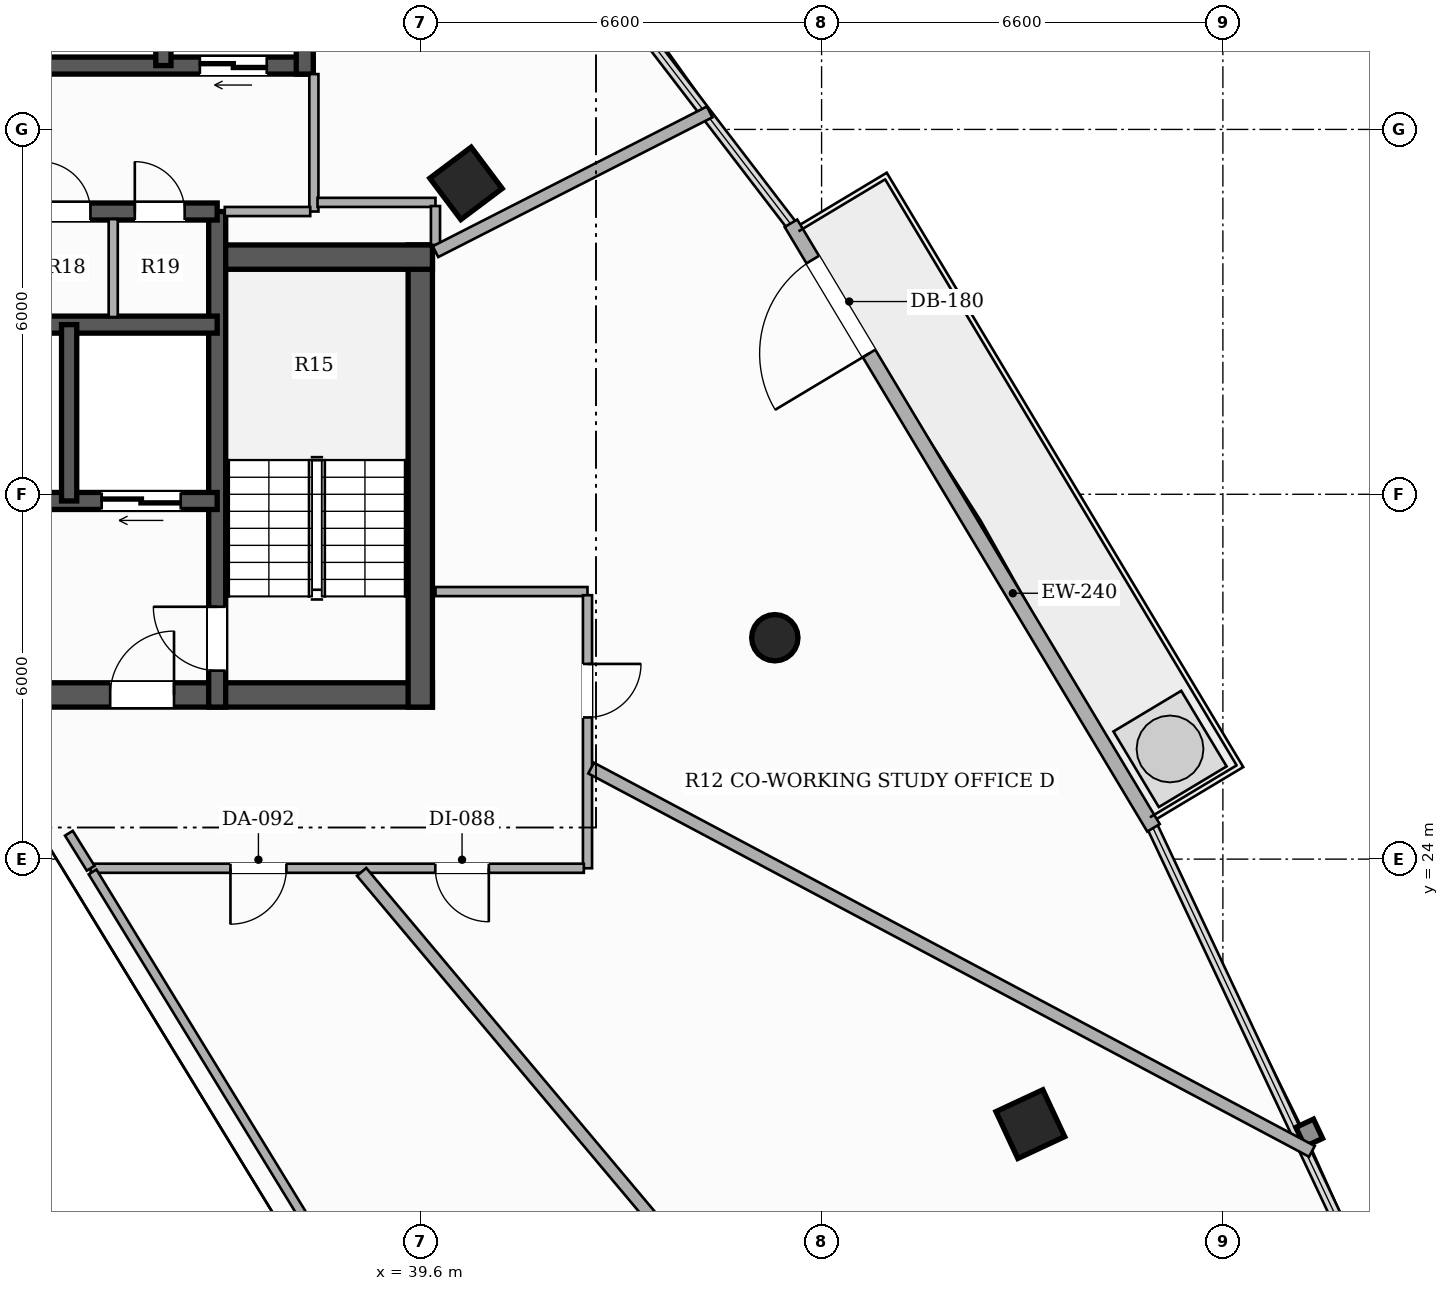
"""IFC4 building model, lengths in metres.
Left out: names, types, materials, properties, quantities, classifications, styles, units other than length and angle.
Written with IfcOpenShell. Run it as: python <this file> out.ifc"""

import sys

from ifc_helpers import new_model, si_unit, direction, frame, frame_2d, origin, origin_2d, place, context, subcontext, project, spatial, rectangle, hollow_rectangle, hollow_circle, extrude, element, fill, save


model = new_model("IFC4")
c1 = context("Model", 3, precision=1e-05, world=origin(), true_north=direction((0.0, 1.0)))
c2 = subcontext(c1, "Body", "Model", "MODEL_VIEW")
j1 = project(units=[si_unit("LENGTHUNIT", "METRE"), si_unit("PLANEANGLEUNIT", "RADIAN")], contexts=[c1])
p1 = place(None, origin())
s1 = spatial("IfcSite", under=j1, at=p1, CompositionType="ELEMENT")
p2 = place(p1, origin())
s2 = spatial("IfcBuilding", under=s1, at=p2, CompositionType="ELEMENT")
p3 = place(p2, frame((0.0, 0.0, 129.8)))
s3 = spatial("IfcBuildingStorey", under=s2, at=p3, CompositionType="ELEMENT", Elevation=129.8)
p4 = place(p3, frame((26.2, 26.7, 0.0), z_axis=(0.0, 0.0, 1.0), x_axis=(1.0, 0.0, 0.0)))
e1 = element("IfcWall", 1, at=p4, inside=s3, PredefinedType="SHEAR", context=c2, shape_type="SweptSolid", body=[
    extrude(rectangle(XDim=13.6, YDim=0.4, at=frame_2d((6.8, 0.0))), origin(), (0.0, 0.0, 1.0), 3.3),
])
p5 = place(p4, frame((4.35, 0.0, 0.0)))
e2 = element("IfcOpeningElement", 2, at=p5, cuts=e1, PredefinedType="OPENING", context=c2, shape_type="SweptSolid", body=[
    extrude(rectangle(XDim=1.05, YDim=2.15, at=frame_2d((0.525, 1.075))), frame((0.0, 0.21, 0.0), z_axis=(0.0, -1.0, 0.0), x_axis=(1.0, 0.0, 0.0)), (0.0, 0.0, 1.0), 0.42),
])
p6 = place(p4, frame((8.3, 0.0, 0.0)))
e3 = element("IfcOpeningElement", 3, at=p6, cuts=e1, PredefinedType="OPENING", context=c2, shape_type="SweptSolid", body=[
    extrude(rectangle(XDim=1.05, YDim=2.15, at=frame_2d((0.525, 1.075))), frame((0.0, 0.21, 0.0), z_axis=(0.0, -1.0, 0.0), x_axis=(1.0, 0.0, 0.0)), (0.0, 0.0, 1.0), 0.42),
])
p7 = place(p3, frame((39.6, 26.5, 0.0), z_axis=(0.0, 0.0, 1.0), x_axis=(0.0, 1.0, 0.0)))
e4 = element("IfcWall", 4, at=p7, inside=s3, PredefinedType="SHEAR", context=c2, shape_type="SweptSolid", body=[
    extrude(rectangle(XDim=7.6, YDim=0.4, at=frame_2d((3.8, 0.0))), origin(), (0.0, 0.0, 1.0), 3.3),
])
p8 = place(p3, frame((36.12, 33.9, 0.0), z_axis=(0.0, 0.0, 1.0), x_axis=(1.0, 0.0, 0.0)))
e5 = element("IfcWall", 5, at=p8, inside=s3, PredefinedType="SHEAR", context=c2, shape_type="SweptSolid", body=[
    extrude(rectangle(XDim=3.68, YDim=0.4, at=frame_2d((1.84, 0.0))), origin(), (0.0, 0.0, 1.0), 3.3),
])
p9 = place(p3, frame((36.26, 26.5, 0.0), z_axis=(0.0, 0.0, 1.0), x_axis=(0.0, 1.0, 0.0)))
e6 = element("IfcWall", 6, at=p9, inside=s3, PredefinedType="SHEAR", context=c2, shape_type="SweptSolid", body=[
    extrude(rectangle(XDim=8.15, YDim=0.28, at=frame_2d((4.075, 0.0))), origin(), (0.0, 0.0, 1.0), 3.3),
])
p10 = place(p9, frame((0.6, 0.0, 0.0)))
e7 = element("IfcOpeningElement", 7, at=p10, cuts=e6, PredefinedType="OPENING", context=c2, shape_type="SweptSolid", body=[
    extrude(rectangle(XDim=1.05, YDim=2.15, at=frame_2d((0.525, 1.075))), frame((0.0, 0.15, 0.0), z_axis=(0.0, -1.0, 0.0), x_axis=(1.0, 0.0, 0.0)), (0.0, 0.0, 1.0), 0.3),
])
p11 = place(p3, frame((36.26, 29.89, 0.0), z_axis=(0.0, 0.0, 1.0), x_axis=(-1.0, 0.0, 0.0)))
e8 = element("IfcWall", 8, at=p11, inside=s3, PredefinedType="SHEAR", context=c2, shape_type="SweptSolid", body=[
    extrude(rectangle(XDim=6.52, YDim=0.28, at=frame_2d((3.26, 0.0))), origin(), (0.0, 0.0, 1.0), 3.3),
])
p12 = place(p11, frame((4.875, 0.0, 0.0)))
e9 = element("IfcOpeningElement", 9, at=p12, cuts=e8, PredefinedType="OPENING", context=c2, shape_type="SweptSolid", body=[
    extrude(rectangle(XDim=1.1, YDim=2.2, at=frame_2d((0.55, 1.1))), frame((0.0, 0.15, 0.0), z_axis=(0.0, -1.0, 0.0), x_axis=(1.0, 0.0, 0.0)), (0.0, 0.0, 1.0), 0.3),
])
p13 = place(p11, frame((2.875, 0.0, 0.0)))
e10 = element("IfcOpeningElement", 10, at=p13, cuts=e8, PredefinedType="OPENING", context=c2, shape_type="SweptSolid", body=[
    extrude(rectangle(XDim=1.1, YDim=2.2, at=frame_2d((0.55, 1.1))), frame((0.0, 0.15, 0.0), z_axis=(0.0, -1.0, 0.0), x_axis=(1.0, 0.0, 0.0)), (0.0, 0.0, 1.0), 0.3),
])
p14 = place(p11, frame((0.6, 0.0, 0.0)))
e11 = element("IfcOpeningElement", 11, at=p14, cuts=e8, PredefinedType="OPENING", context=c2, shape_type="SweptSolid", body=[
    extrude(rectangle(XDim=1.3, YDim=2.2, at=frame_2d((0.65, 1.1))), frame((0.0, 0.15, 0.0), z_axis=(0.0, -1.0, 0.0), x_axis=(1.0, 0.0, 0.0)), (0.0, 0.0, 1.0), 0.3),
])
p15 = place(p3, frame((29.74, 32.79, 0.0), z_axis=(0.0, 0.0, 1.0), x_axis=(1.0, 0.0, 0.0)))
e12 = element("IfcWall", 12, at=p15, inside=s3, PredefinedType="SHEAR", context=c2, shape_type="SweptSolid", body=[
    extrude(rectangle(XDim=6.52, YDim=0.28, at=frame_2d((3.26, 0.0))), origin(), (0.0, 0.0, 1.0), 3.3),
])
p16 = place(p3, frame((33.825, 29.89, 0.0), z_axis=(0.0, 0.0, 1.0), x_axis=(0.0, 1.0, 0.0)))
e13 = element("IfcWall", 13, at=p16, inside=s3, PredefinedType="SHEAR", context=c2, shape_type="SweptSolid", body=[
    extrude(rectangle(XDim=2.9, YDim=0.25, at=frame_2d((1.45, 0.0))), origin(), (0.0, 0.0, 1.0), 3.3),
])
p17 = place(p3, frame((29.74, 34.65, 0.0), z_axis=(0.0, 0.0, 1.0), x_axis=(1.0, 0.0, 0.0)))
e14 = element("IfcWall", 14, at=p17, inside=s3, PredefinedType="SHEAR", context=c2, shape_type="SweptSolid", body=[
    extrude(rectangle(XDim=6.52, YDim=0.28, at=frame_2d((3.26, 0.0))), origin(), (0.0, 0.0, 1.0), 3.3),
])
p18 = place(p17, frame((0.515, 0.0, 0.0)))
e15 = element("IfcOpeningElement", 15, at=p18, cuts=e14, PredefinedType="OPENING", context=c2, shape_type="SweptSolid", body=[
    extrude(rectangle(XDim=0.82, YDim=2.1, at=frame_2d((0.41, 1.05))), frame((0.0, 0.15, 0.0), z_axis=(0.0, -1.0, 0.0), x_axis=(1.0, 0.0, 0.0)), (0.0, 0.0, 1.0), 0.3),
])
p19 = place(p17, frame((2.065, 0.0, 0.0)))
e16 = element("IfcOpeningElement", 16, at=p19, cuts=e14, PredefinedType="OPENING", context=c2, shape_type="SweptSolid", body=[
    extrude(rectangle(XDim=0.82, YDim=2.1, at=frame_2d((0.41, 1.05))), frame((0.0, 0.15, 0.0), z_axis=(0.0, -1.0, 0.0), x_axis=(1.0, 0.0, 0.0)), (0.0, 0.0, 1.0), 0.3),
])
p20 = place(p17, frame((3.615, 0.0, 0.0)))
e17 = element("IfcOpeningElement", 17, at=p20, cuts=e14, PredefinedType="OPENING", context=c2, shape_type="SweptSolid", body=[
    extrude(rectangle(XDim=0.82, YDim=2.1, at=frame_2d((0.41, 1.05))), frame((0.0, 0.15, 0.0), z_axis=(0.0, -1.0, 0.0), x_axis=(1.0, 0.0, 0.0)), (0.0, 0.0, 1.0), 0.3),
])
p21 = place(p17, frame((5.165, 0.0, 0.0)))
e18 = element("IfcOpeningElement", 18, at=p21, cuts=e14, PredefinedType="OPENING", context=c2, shape_type="SweptSolid", body=[
    extrude(rectangle(XDim=0.82, YDim=2.1, at=frame_2d((0.41, 1.05))), frame((0.0, 0.15, 0.0), z_axis=(0.0, -1.0, 0.0), x_axis=(1.0, 0.0, 0.0)), (0.0, 0.0, 1.0), 0.3),
])
p22 = place(p3, frame((37.84, 37.05, 0.0), z_axis=(0.0, 0.0, 1.0), x_axis=(-1.0, 0.0, 0.0)))
e19 = element("IfcWall", 19, at=p22, inside=s3, PredefinedType="SHEAR", context=c2, shape_type="SweptSolid", body=[
    extrude(rectangle(XDim=9.68, YDim=0.28, at=frame_2d((4.84, 0.0))), origin(), (0.0, 0.0, 1.0), 3.3),
])
p23 = place(p22, frame((7.815, 0.0, 0.0)))
e20 = element("IfcOpeningElement", 20, at=p23, cuts=e19, PredefinedType="OPENING", context=c2, shape_type="SweptSolid", body=[
    extrude(rectangle(XDim=1.1, YDim=2.2, at=frame_2d((0.55, 1.1))), frame((0.0, 0.15, 0.0), z_axis=(0.0, -1.0, 0.0), x_axis=(1.0, 0.0, 0.0)), (0.0, 0.0, 1.0), 0.3),
])
p24 = place(p22, frame((0.765, 0.0, 0.0)))
e21 = element("IfcOpeningElement", 21, at=p24, cuts=e19, PredefinedType="OPENING", context=c2, shape_type="SweptSolid", body=[
    extrude(rectangle(XDim=1.1, YDim=2.2, at=frame_2d((0.55, 1.1))), frame((0.0, 0.15, 0.0), z_axis=(0.0, -1.0, 0.0), x_axis=(1.0, 0.0, 0.0)), (0.0, 0.0, 1.0), 0.3),
])
p25 = place(p3, frame((37.7, 36.91, 0.0), z_axis=(0.0, 0.0, 1.0), x_axis=(0.0, 1.0, 0.0)))
e22 = element("IfcWall", 22, at=p25, inside=s3, PredefinedType="SHEAR", context=c2, shape_type="SweptSolid", body=[
    extrude(rectangle(XDim=2.83, YDim=0.28, at=frame_2d((1.415, 0.0))), origin(), (0.0, 0.0, 1.0), 3.3),
])
p26 = place(p3, frame((35.375, 37.05, 0.0), z_axis=(0.0, 0.0, 1.0), x_axis=(0.0, 1.0, 0.0)))
e23 = element("IfcWall", 23, at=p26, inside=s3, PredefinedType="SHEAR", context=c2, shape_type="SweptSolid", body=[
    extrude(rectangle(XDim=2.55, YDim=0.25, at=frame_2d((1.275, 0.0))), origin(), (0.0, 0.0, 1.0), 3.3),
])
p27 = place(p3, frame((49.633, 19.642, 0.0), z_axis=(0.0, 0.0, 1.0), x_axis=(-0.422618261741, 0.906307787037, 0.0)))
e24 = element("IfcColumn", 24, at=p27, inside=s3, PredefinedType="COLUMN", context=c2, shape_type="SweptSolid", body=[
    extrude(hollow_rectangle(XDim=0.85, YDim=0.85, WallThickness=0.028, at=origin_2d()), origin(), (0.0, 0.0, 1.0), 3.3),
])
p28 = place(p3, frame((45.431, 27.641, 0.0), z_axis=(0.0, 0.0, 1.0), x_axis=(1.0, 0.0, 0.0)))
e25 = element("IfcColumn", 25, at=p28, inside=s3, PredefinedType="COLUMN", context=c2, shape_type="SweptSolid", body=[
    extrude(hollow_circle(Radius=0.381, WallThickness=0.022, at=origin_2d()), origin(), (0.0, 0.0, 1.0), 3.3),
])
p29 = place(p3, frame((40.352, 35.113, 0.0), z_axis=(0.0, 0.0, 1.0), x_axis=(-0.600420225326, 0.799684658487, 0.0)))
e26 = element("IfcColumn", 26, at=p29, inside=s3, PredefinedType="COLUMN", context=c2, shape_type="SweptSolid", body=[
    extrude(hollow_rectangle(XDim=0.85, YDim=0.85, WallThickness=0.028, at=origin_2d()), origin(), (0.0, 0.0, 1.0), 3.3),
])
p30 = place(p3, frame((51.659, 24.515, 0.0), z_axis=(0.0, 0.0, 1.0), x_axis=(-0.514343998995, 0.857583961311, 0.0)))
e27 = element("IfcWall", 27, at=p30, inside=s3, PredefinedType="SOLIDWALL", context=c2, shape_type="SweptSolid", body=[
    extrude(rectangle(XDim=11.593, YDim=0.24, at=frame_2d((5.797, 0.0))), origin(), (0.0, 0.0, 1.0), 2.624),
])
p31 = place(p30, frame((9.096, 0.0, 0.0)))
e28 = element("IfcOpeningElement", 28, at=p31, cuts=e27, PredefinedType="OPENING", context=c2, shape_type="SweptSolid", body=[
    extrude(rectangle(XDim=1.8, YDim=2.2, at=frame_2d((0.9, 1.1))), frame((0.0, 0.13, 0.0), z_axis=(0.0, -1.0, 0.0), x_axis=(1.0, 0.0, 0.0)), (0.0, 0.0, 1.0), 0.26),
])
p32 = place(p3, frame((37.85, 34.65, 0.0), z_axis=(0.0, 0.0, 1.0), x_axis=(0.0, 1.0, 0.0)))
e29 = element("IfcWall", 29, at=p32, inside=s3, PredefinedType="PARTITIONING", context=c2, shape_type="SweptSolid", body=[
    extrude(rectangle(XDim=2.26, YDim=0.15, at=frame_2d((1.13, 0.0))), origin(), (0.0, 0.0, 1.0), 3.06),
])
p33 = place(p3, frame((36.385, 34.65, 0.0), z_axis=(0.0, 0.0, 1.0), x_axis=(1.0, 0.0, 0.0)))
e30 = element("IfcWall", 30, at=p33, inside=s3, PredefinedType="PARTITIONING", context=c2, shape_type="SweptSolid", body=[
    extrude(rectangle(XDim=1.405, YDim=0.15, at=frame_2d((0.703, 0.0))), origin(), (0.0, 0.0, 1.0), 2.425),
])
p34 = place(p3, frame((34.55, 32.915, 0.0), z_axis=(0.0, 0.0, 1.0), x_axis=(0.0, 1.0, 0.0)))
e31 = element("IfcWall", 31, at=p34, inside=s3, PredefinedType="PARTITIONING", context=c2, shape_type="SweptSolid", body=[
    extrude(rectangle(XDim=1.61, YDim=0.15, at=frame_2d((0.805, 0.0))), origin(), (0.0, 0.0, 1.0), 3.06),
])
p35 = place(p3, frame((39.85, 28.4, 0.0), z_axis=(0.0, 0.0, 1.0), x_axis=(1.0, 0.0, 0.0)))
e32 = element("IfcWall", 32, at=p35, inside=s3, PredefinedType="PARTITIONING", context=c2, shape_type="SweptSolid", body=[
    extrude(rectangle(XDim=2.5, YDim=0.15, at=frame_2d((1.25, 0.0))), origin(), (0.0, 0.0, 1.0), 2.721),
])
p36 = place(p3, frame((42.35, 28.34, 0.0), z_axis=(0.0, 0.0, 1.0), x_axis=(0.0, -1.0, 0.0)))
e33 = element("IfcWall", 33, at=p36, inside=s3, PredefinedType="PARTITIONING", context=c2, shape_type="SweptSolid", body=[
    extrude(rectangle(XDim=4.49, YDim=0.15, at=frame_2d((2.245, 0.0))), origin(), (0.0, 0.0, 1.0), 2.721),
])
p37 = place(p36, frame((1.13, 0.0, 0.0)))
e34 = element("IfcOpeningElement", 34, at=p37, cuts=e33, PredefinedType="OPENING", context=c2, shape_type="SweptSolid", body=[
    extrude(rectangle(XDim=0.88, YDim=2.1, at=frame_2d((0.44, 1.05))), frame((0.0, 0.085, 0.0), z_axis=(0.0, -1.0, 0.0), x_axis=(1.0, 0.0, 0.0)), (0.0, 0.0, 1.0), 0.17),
])
p38 = place(p3, frame((42.29, 23.85, 0.0), z_axis=(0.0, 0.0, 1.0), x_axis=(-1.0, 0.0, 0.0)))
e35 = element("IfcWall", 35, at=p38, inside=s3, PredefinedType="PARTITIONING", context=c2, shape_type="SweptSolid", body=[
    extrude(rectangle(XDim=8.111, YDim=0.15, at=frame_2d((4.056, 0.0))), origin(), (0.0, 0.0, 1.0), 2.492),
])
p39 = place(p38, frame((1.563, 0.0, 0.0)))
e36 = element("IfcOpeningElement", 36, at=p39, cuts=e35, PredefinedType="OPENING", context=c2, shape_type="SweptSolid", body=[
    extrude(rectangle(XDim=0.88, YDim=2.1, at=frame_2d((0.44, 1.05))), frame((0.0, 0.085, 0.0), z_axis=(0.0, -1.0, 0.0), x_axis=(1.0, 0.0, 0.0)), (0.0, 0.0, 1.0), 0.17),
])
p40 = place(p38, frame((4.892, 0.0, 0.0)))
e37 = element("IfcOpeningElement", 37, at=p40, cuts=e35, PredefinedType="OPENING", context=c2, shape_type="SweptSolid", body=[
    extrude(rectangle(XDim=0.92, YDim=2.15, at=frame_2d((0.46, 1.075))), frame((0.0, 0.085, 0.0), z_axis=(0.0, -1.0, 0.0), x_axis=(1.0, 0.0, 0.0)), (0.0, 0.0, 1.0), 0.17),
])
p41 = place(p3, frame((34.179, 23.85, 0.0), z_axis=(0.0, 0.0, 1.0), x_axis=(-0.527828834635, 0.849350764601, 0.0)))
e38 = element("IfcWall", 38, at=p41, inside=s3, PredefinedType="PARTITIONING", context=c2, shape_type="SweptSolid", body=[
    extrude(rectangle(XDim=0.678, YDim=0.15, at=frame_2d((0.339, 0.0))), origin(), (0.0, 0.0, 1.0), 3.06),
])
p42 = place(p3, frame((37.91, 34.8, 0.0), z_axis=(0.0, 0.0, 1.0), x_axis=(1.0, 0.0, 0.0)))
e39 = element("IfcWall", 39, at=p42, inside=s3, PredefinedType="PARTITIONING", context=c2, shape_type="SweptSolid", body=[
    extrude(rectangle(XDim=1.94, YDim=0.15, at=frame_2d((0.97, 0.0))), origin(), (0.0, 0.0, 1.0), 2.721),
])
p43 = place(p3, frame((39.85, 34.74, 0.0), z_axis=(0.0, 0.0, 1.0), x_axis=(0.0, -1.0, 0.0)))
e40 = element("IfcWall", 40, at=p43, inside=s3, PredefinedType="PARTITIONING", context=c2, shape_type="SweptSolid", body=[
    extrude(rectangle(XDim=0.64, YDim=0.15, at=frame_2d((0.32, 0.0))), origin(), (0.0, 0.0, 1.0), 2.721),
])
p44 = place(p3, frame((34.21, 23.79, 0.0), z_axis=(0.0, 0.0, 1.0), x_axis=(0.521925672495, -0.852990968528, 0.0)))
e41 = element("IfcWall", 41, at=p44, inside=s3, PredefinedType="PARTITIONING", context=c2, shape_type="SweptSolid", body=[
    extrude(rectangle(XDim=8.116, YDim=0.15, at=frame_2d((4.058, 0.0))), origin(), (0.0, 0.0, 1.0), 2.721),
])
p45 = place(p3, frame((54.526, 4.867, 0.0), z_axis=(0.0, 0.0, 1.0), x_axis=(-0.643084567011, 0.765795168222, 0.0)))
e42 = element("IfcWall", 42, at=p45, inside=s3, PredefinedType="PARTITIONING", context=c2, shape_type="SweptSolid", body=[
    extrude(rectangle(XDim=24.71, YDim=0.2, at=frame_2d((12.355, 0.0))), origin(), (0.0, 0.0, 1.0), 2.413),
])
p46 = place(p3, frame((42.41, 25.497, 0.0), z_axis=(0.0, 0.0, 1.0), x_axis=(0.882944726502, -0.46947695358, 0.0)))
e43 = element("IfcWall", 43, at=p46, inside=s3, PredefinedType="PARTITIONING", context=c2, shape_type="SweptSolid", body=[
    extrude(rectangle(XDim=13.426, YDim=0.2, at=frame_2d((6.713, 0.0))), origin(), (0.0, 0.0, 1.0), 2.413),
])
p47 = place(p3, frame((44.359, 36.288, 0.0), z_axis=(0.0, 0.0, 1.0), x_axis=(-0.890946333403, -0.454108611453, 0.0)))
e44 = element("IfcWall", 44, at=p47, inside=s3, PredefinedType="PARTITIONING", context=c2, shape_type="SweptSolid", body=[
    extrude(rectangle(XDim=5.061, YDim=0.2, at=frame_2d((2.53, 0.0))), origin(), (0.0, 0.0, 1.0), 2.413),
])
p48 = place(p31, origin())
e45 = element("IfcDoor", 45, at=p48, inside=s3, OperationType="SINGLE_SWING_LEFT", PredefinedType="DOOR", context=c2, shape_type="SweptSolid", body=[
    extrude(rectangle(XDim=1.8, YDim=2.2, at=frame_2d((0.9, 1.1))), frame((0.0, 0.025, 0.0), z_axis=(0.0, -1.0, 0.0), x_axis=(1.0, 0.0, 0.0)), (0.0, 0.0, 1.0), 0.05),
])
fill(e28, e45)
p49 = place(p10, origin())
e46 = element("IfcDoor", 46, at=p49, inside=s3, OperationType="SINGLE_SWING_RIGHT", PredefinedType="DOOR", context=c2, shape_type="SweptSolid", body=[
    extrude(rectangle(XDim=1.05, YDim=2.15, at=frame_2d((0.525, 1.075))), frame((0.0, 0.025, 0.0), z_axis=(0.0, -1.0, 0.0), x_axis=(1.0, 0.0, 0.0)), (0.0, 0.0, 1.0), 0.05),
])
fill(e7, e46)
p50 = place(p6, origin())
e47 = element("IfcDoor", 47, at=p50, inside=s3, OperationType="SINGLE_SWING_RIGHT", PredefinedType="DOOR", context=c2, shape_type="SweptSolid", body=[
    extrude(rectangle(XDim=1.05, YDim=2.15, at=frame_2d((0.525, 1.075))), frame((0.0, 0.025, 0.0), z_axis=(0.0, -1.0, 0.0), x_axis=(1.0, 0.0, 0.0)), (0.0, 0.0, 1.0), 0.05),
])
fill(e3, e47)
p51 = place(p14, origin())
e48 = element("IfcDoor", 48, at=p51, inside=s3, OperationType="DOUBLE_DOOR_SLIDING", PredefinedType="DOOR", context=c2, shape_type="SweptSolid", body=[
    extrude(rectangle(XDim=1.3, YDim=2.2, at=frame_2d((0.65, 1.1))), frame((0.0, 0.025, 0.0), z_axis=(0.0, -1.0, 0.0), x_axis=(1.0, 0.0, 0.0)), (0.0, 0.0, 1.0), 0.05),
])
fill(e11, e48)
p52 = place(p24, origin())
e49 = element("IfcDoor", 49, at=p52, inside=s3, OperationType="DOUBLE_DOOR_SLIDING", PredefinedType="DOOR", context=c2, shape_type="SweptSolid", body=[
    extrude(rectangle(XDim=1.1, YDim=2.2, at=frame_2d((0.55, 1.1))), frame((0.0, 0.025, 0.0), z_axis=(0.0, -1.0, 0.0), x_axis=(1.0, 0.0, 0.0)), (0.0, 0.0, 1.0), 0.05),
])
fill(e21, e49)
p53 = place(p20, origin())
e50 = element("IfcDoor", 50, at=p53, inside=s3, OperationType="SINGLE_SWING_LEFT", PredefinedType="DOOR", context=c2, shape_type="SweptSolid", body=[
    extrude(rectangle(XDim=0.82, YDim=2.1, at=frame_2d((0.41, 1.05))), frame((0.0, 0.025, 0.0), z_axis=(0.0, -1.0, 0.0), x_axis=(1.0, 0.0, 0.0)), (0.0, 0.0, 1.0), 0.05),
])
fill(e17, e50)
p54 = place(p21, origin())
e51 = element("IfcDoor", 51, at=p54, inside=s3, OperationType="SINGLE_SWING_LEFT", PredefinedType="DOOR", context=c2, shape_type="SweptSolid", body=[
    extrude(rectangle(XDim=0.82, YDim=2.1, at=frame_2d((0.41, 1.05))), frame((0.0, 0.025, 0.0), z_axis=(0.0, -1.0, 0.0), x_axis=(1.0, 0.0, 0.0)), (0.0, 0.0, 1.0), 0.05),
])
fill(e18, e51)
p55 = place(p39, origin())
e52 = element("IfcDoor", 52, at=p55, inside=s3, OperationType="SINGLE_SWING_LEFT", PredefinedType="DOOR", context=c2, shape_type="SweptSolid", body=[
    extrude(rectangle(XDim=0.88, YDim=2.1, at=frame_2d((0.44, 1.05))), frame((0.0, 0.025, 0.0), z_axis=(0.0, -1.0, 0.0), x_axis=(1.0, 0.0, 0.0)), (0.0, 0.0, 1.0), 0.05),
])
fill(e36, e52)
p56 = place(p40, origin())
e53 = element("IfcDoor", 53, at=p56, inside=s3, OperationType="SINGLE_SWING_RIGHT", PredefinedType="DOOR", context=c2, shape_type="SweptSolid", body=[
    extrude(rectangle(XDim=0.92, YDim=2.15, at=frame_2d((0.46, 1.075))), frame((0.0, 0.025, 0.0), z_axis=(0.0, -1.0, 0.0), x_axis=(1.0, 0.0, 0.0)), (0.0, 0.0, 1.0), 0.05),
])
fill(e37, e53)
p57 = place(p37, origin())
e54 = element("IfcDoor", 54, at=p57, inside=s3, OperationType="SINGLE_SWING_LEFT", PredefinedType="DOOR", context=c2, shape_type="SweptSolid", body=[
    extrude(rectangle(XDim=0.88, YDim=2.1, at=frame_2d((0.44, 1.05))), frame((0.0, 0.025, 0.0), z_axis=(0.0, -1.0, 0.0), x_axis=(1.0, 0.0, 0.0)), (0.0, 0.0, 1.0), 0.05),
])
fill(e34, e54)
save(model, sys.argv[1])
